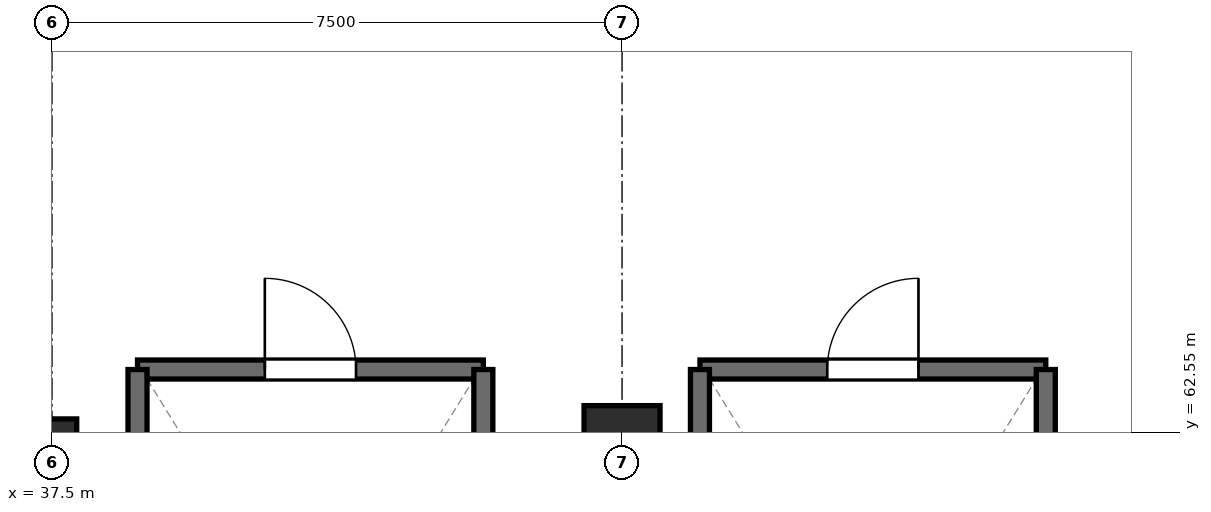
"""IFC4 building model, lengths in metres.
Left out: names, types, materials, properties, quantities, classifications, styles, units other than length and angle.
Written with IfcOpenShell. Run it as: python <this file> out.ifc"""

import sys

from ifc_helpers import new_model, si_unit, direction, frame, frame_2d, origin, origin_2d, place, context, subcontext, project, spatial, rectangle, extrude, element, fill, save


model = new_model("IFC4")
c1 = context("Model", 3, precision=1e-05, world=origin(), true_north=direction((0.0, 1.0)))
c2 = subcontext(c1, "Body", "Model", "MODEL_VIEW")
j1 = project(units=[si_unit("LENGTHUNIT", "METRE"), si_unit("PLANEANGLEUNIT", "RADIAN")], contexts=[c1])
p1 = place(None, origin())
s1 = spatial("IfcSite", under=j1, at=p1, CompositionType="ELEMENT")
p2 = place(p1, origin())
s2 = spatial("IfcBuilding", under=s1, at=p2, CompositionType="ELEMENT")
p3 = place(p2, origin())
s3 = spatial("IfcBuildingStorey", under=s2, at=p3, CompositionType="ELEMENT", Elevation=0.0)
p4 = place(p3, frame((37.5, 62.4, -0.35), z_axis=(0.0, 0.0, 1.0), x_axis=(1.0, 0.0, 0.0)))
e1 = element("IfcColumn", 1, at=p4, inside=s3, PredefinedType="COLUMN", context=c2, shape_type="SweptSolid", body=[
    extrude(rectangle(XDim=0.65, YDim=0.65, at=origin_2d()), origin(), (0.0, 0.0, 1.0), 4.65),
])
p5 = place(p3, frame((45.0, 62.4, -0.35), z_axis=(0.0, 0.0, 1.0), x_axis=(1.0, 0.0, 0.0)))
e2 = element("IfcColumn", 2, at=p5, inside=s3, PredefinedType="COLUMN", context=c2, shape_type="SweptSolid", body=[
    extrude(rectangle(XDim=1.0, YDim=1.0, at=origin_2d()), origin(), (0.0, 0.0, 1.0), 4.65),
])
p6 = place(p3, frame((50.575, 63.375, 0.0), z_axis=(0.0, 0.0, 1.0), x_axis=(-1.0, 0.0, 0.0)))
e3 = element("IfcWall", 3, at=p6, inside=s3, PredefinedType="SHEAR", context=c2, shape_type="SweptSolid", body=[
    extrude(rectangle(XDim=4.55, YDim=0.25, at=frame_2d((2.275, 0.0))), origin(), (0.0, 0.0, 1.0), 4.3),
])
p7 = place(p6, frame((1.675, 0.0, 0.0)))
e4 = element("IfcOpeningElement", 4, at=p7, cuts=e3, PredefinedType="OPENING", context=c2, shape_type="SweptSolid", body=[
    extrude(rectangle(XDim=1.2, YDim=2.2, at=frame_2d((0.6, 1.1))), frame((0.0, 0.137, 0.0), z_axis=(0.0, -1.0, 0.0), x_axis=(1.0, 0.0, 0.0)), (0.0, 0.0, 1.0), 0.274),
])
for number, where, z_axis, x_axis in (
    (5, (46.025, 63.375, 0.0), (0.0, 0.0, 1.0), (0.0, -1.0, 0.0)),
    (6, (50.575, 56.175, 0.0), (0.0, 0.0, 1.0), (0.0, 1.0, 0.0)),
):
    element("IfcWall", number, at=place(p3, frame(where, z_axis=z_axis, x_axis=x_axis)), inside=s3, PredefinedType="SHEAR", context=c2, shape_type="SweptSolid", body=[
        extrude(rectangle(XDim=7.2, YDim=0.25, at=frame_2d((3.6, 0.0))), origin(), (0.0, 0.0, 1.0), 4.3),
    ])
p8 = place(p3, frame((43.175, 63.375, 0.0), z_axis=(0.0, 0.0, 1.0), x_axis=(-1.0, 0.0, 0.0)))
e7 = element("IfcWall", 7, at=p8, inside=s3, PredefinedType="SHEAR", context=c2, shape_type="SweptSolid", body=[
    extrude(rectangle(XDim=4.55, YDim=0.25, at=frame_2d((2.275, 0.0))), origin(), (0.0, 0.0, 1.0), 4.3),
])
p9 = place(p8, frame((1.675, 0.0, 0.0)))
e8 = element("IfcOpeningElement", 8, at=p9, cuts=e7, PredefinedType="OPENING", context=c2, shape_type="SweptSolid", body=[
    extrude(rectangle(XDim=1.2, YDim=2.2, at=frame_2d((0.6, 1.1))), frame((0.0, 0.137, 0.0), z_axis=(0.0, -1.0, 0.0), x_axis=(1.0, 0.0, 0.0)), (0.0, 0.0, 1.0), 0.274),
])
for number, where, z_axis, x_axis in (
    (9, (38.625, 63.375, 0.0), (0.0, 0.0, 1.0), (0.0, -1.0, 0.0)),
    (10, (43.175, 56.175, 0.0), (0.0, 0.0, 1.0), (0.0, 1.0, 0.0)),
):
    element("IfcWall", number, at=place(p3, frame(where, z_axis=z_axis, x_axis=x_axis)), inside=s3, PredefinedType="SHEAR", context=c2, shape_type="SweptSolid", body=[
        extrude(rectangle(XDim=7.2, YDim=0.25, at=frame_2d((3.6, 0.0))), origin(), (0.0, 0.0, 1.0), 4.3),
    ])
p10 = place(p7, frame((1.2, 0.0, 0.0), z_axis=(0.0, 0.0, 1.0), x_axis=(-1.0, 0.0, 0.0)))
e11 = element("IfcDoor", 11, at=p10, inside=s3, OperationType="SINGLE_SWING_LEFT", PredefinedType="DOOR", context=c2, shape_type="SweptSolid", body=[
    extrude(rectangle(XDim=1.2, YDim=2.2, at=frame_2d((0.6, 1.1))), frame((0.0, 0.025, 0.0), z_axis=(0.0, -1.0, 0.0), x_axis=(1.0, 0.0, 0.0)), (0.0, 0.0, 1.0), 0.05),
])
fill(e4, e11)
p11 = place(p9, frame((1.2, 0.0, 0.0), z_axis=(0.0, 0.0, 1.0), x_axis=(-1.0, 0.0, 0.0)))
e12 = element("IfcDoor", 12, at=p11, inside=s3, OperationType="SINGLE_SWING_RIGHT", PredefinedType="DOOR", context=c2, shape_type="SweptSolid", body=[
    extrude(rectangle(XDim=1.2, YDim=2.2, at=frame_2d((0.6, 1.1))), frame((0.0, 0.025, 0.0), z_axis=(0.0, -1.0, 0.0), x_axis=(1.0, 0.0, 0.0)), (0.0, 0.0, 1.0), 0.05),
])
fill(e8, e12)
save(model, sys.argv[1])
